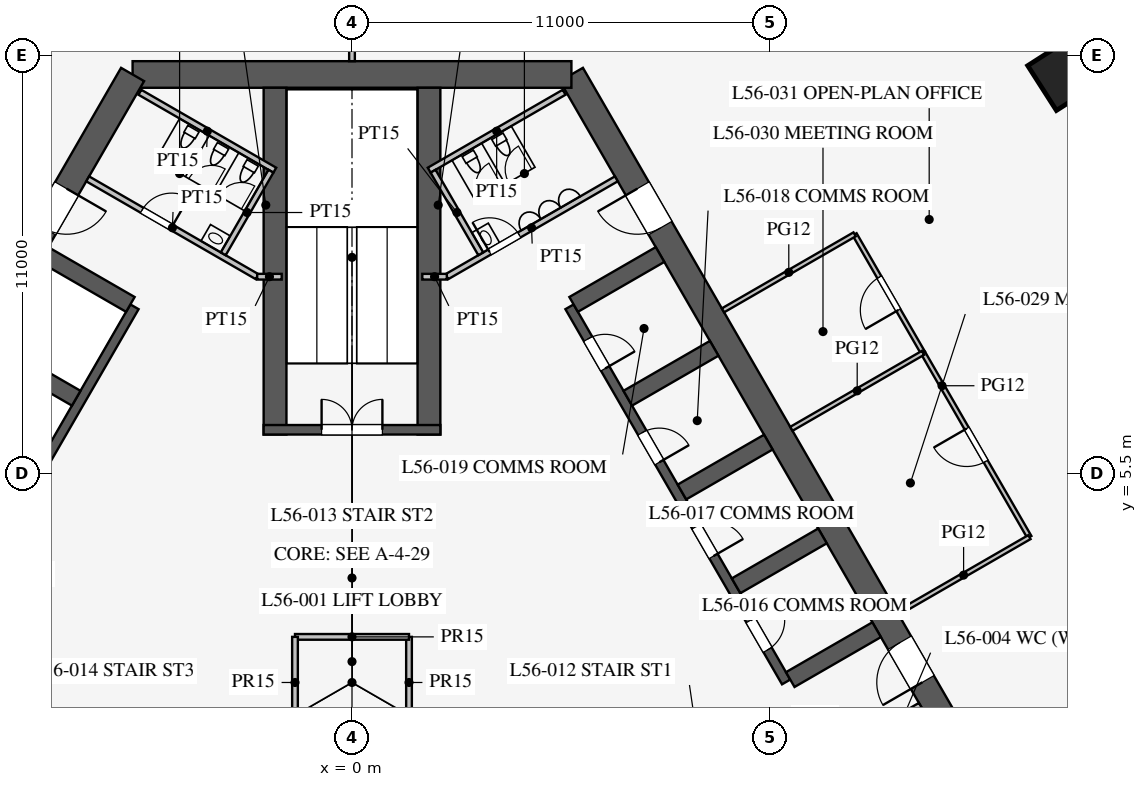
"""IFC4 building model, lengths in metres.
Left out: names, types, materials, properties, quantities, classifications, styles, units other than length and angle.
Written with IfcOpenShell. Run it as: python <this file> out.ifc"""

import sys

from ifc_helpers import new_model, si_unit, direction, frame, frame_2d, origin, origin_2d, place, context, subcontext, project, spatial, rectangle, extrude, element, fill, save


model = new_model("IFC4")
c1 = context("Model", 3, precision=1e-05, world=origin(), true_north=direction((0.0, 1.0)))
c2 = subcontext(c1, "Body", "Model", "MODEL_VIEW")
j1 = project(units=[si_unit("LENGTHUNIT", "METRE"), si_unit("PLANEANGLEUNIT", "RADIAN")], contexts=[c1])
p1 = place(None, origin())
s1 = spatial("IfcSite", under=j1, at=p1, CompositionType="ELEMENT")
p2 = place(p1, origin())
s2 = spatial("IfcBuilding", under=s1, at=p2, CompositionType="ELEMENT")
p3 = place(p2, frame((0.0, 0.0, 244.3)))
s3 = spatial("IfcBuildingStorey", under=s2, at=p3, CompositionType="ELEMENT", Elevation=244.3)
p4 = place(p3, frame((18.748, 16.02, 0.0), z_axis=(0.0, 0.0, 1.0), x_axis=(-0.539270410114, 0.842132664593, 0.0)))
e1 = element("IfcColumn", 1, at=p4, inside=s3, PredefinedType="COLUMN", context=c2, shape_type="SweptSolid", body=[
    extrude(rectangle(XDim=1.4, YDim=1.4, at=origin_2d()), origin(), (0.0, 0.0, 1.0), 4.2),
])
p5 = place(p3, frame((16.743, -3.0, 0.0), z_axis=(0.0, 0.0, 1.0), x_axis=(-0.500002442456, 0.866023993627, 0.0)))
e2 = element("IfcWall", 2, at=p5, inside=s3, PredefinedType="SHEAR", context=c2, shape_type="SweptSolid", body=[
    extrude(rectangle(XDim=21.939, YDim=0.7, at=frame_2d((10.97, 0.0))), origin(), (0.0, 0.0, 1.0), 4.2),
])
p6 = place(p5, frame((17.27, 0.0, 0.0)))
e3 = element("IfcOpeningElement", 3, at=p6, cuts=e2, PredefinedType="OPENING", context=c2, shape_type="SweptSolid", body=[
    extrude(rectangle(XDim=1.2, YDim=2.1, at=frame_2d((0.6, 1.05))), frame((0.0, 0.36, 0.0), z_axis=(0.0, -1.0, 0.0), x_axis=(1.0, 0.0, 0.0)), (0.0, 0.0, 1.0), 0.72),
])
p7 = place(p5, frame((3.47, 0.0, 0.0)))
e4 = element("IfcOpeningElement", 4, at=p7, cuts=e2, PredefinedType="OPENING", context=c2, shape_type="SweptSolid", body=[
    extrude(rectangle(XDim=1.2, YDim=2.1, at=frame_2d((0.6, 1.05))), frame((0.0, 0.36, 0.0), z_axis=(0.0, -1.0, 0.0), x_axis=(1.0, 0.0, 0.0)), (0.0, 0.0, 1.0), 0.72),
])
p8 = place(p3, frame((5.773, 16.0, 0.0), z_axis=(0.0, 0.0, 1.0), x_axis=(-1.0, 0.0, 0.0)))
e5 = element("IfcWall", 5, at=p8, inside=s3, PredefinedType="SHEAR", context=c2, shape_type="SweptSolid", body=[
    extrude(rectangle(XDim=11.547, YDim=0.7, at=frame_2d((5.773, 0.0))), origin(), (0.0, 0.0, 1.0), 4.2),
])
p9 = place(p3, frame((-5.773, 16.0, 0.0), z_axis=(0.0, 0.0, 1.0), x_axis=(-0.500002442456, -0.866023993627, 0.0)))
e6 = element("IfcWall", 6, at=p9, inside=s3, PredefinedType="SHEAR", context=c2, shape_type="SweptSolid", body=[
    extrude(rectangle(XDim=21.939, YDim=0.7, at=frame_2d((10.97, 0.0))), origin(), (0.0, 0.0, 1.0), 4.2),
])
p10 = place(p9, frame((17.27, 0.0, 0.0)))
e7 = element("IfcOpeningElement", 7, at=p10, cuts=e6, PredefinedType="OPENING", context=c2, shape_type="SweptSolid", body=[
    extrude(rectangle(XDim=1.2, YDim=2.1, at=frame_2d((0.6, 1.05))), frame((0.0, 0.36, 0.0), z_axis=(0.0, -1.0, 0.0), x_axis=(1.0, 0.0, 0.0)), (0.0, 0.0, 1.0), 0.72),
])
p11 = place(p9, frame((3.47, 0.0, 0.0)))
e8 = element("IfcOpeningElement", 8, at=p11, cuts=e6, PredefinedType="OPENING", context=c2, shape_type="SweptSolid", body=[
    extrude(rectangle(XDim=1.2, YDim=2.1, at=frame_2d((0.6, 1.05))), frame((0.0, 0.36, 0.0), z_axis=(0.0, -1.0, 0.0), x_axis=(1.0, 0.0, 0.0)), (0.0, 0.0, 1.0), 0.72),
])
p12 = place(p3, frame((11.424, 0.014, 0.0), z_axis=(0.0, 0.0, 1.0), x_axis=(-0.500001763848, 0.866024385424, 0.0)))
e9 = element("IfcWall", 9, at=p12, inside=s3, PredefinedType="SHEAR", context=c2, shape_type="SweptSolid", body=[
    extrude(rectangle(XDim=11.4, YDim=0.25, at=frame_2d((5.7, 0.0))), origin(), (0.0, 0.0, 1.0), 4.2),
])
p13 = place(p12, frame((0.975, 0.0, 0.0)))
e10 = element("IfcOpeningElement", 10, at=p13, cuts=e9, PredefinedType="OPENING", context=c2, shape_type="SweptSolid", body=[
    extrude(rectangle(XDim=0.9, YDim=2.1, at=frame_2d((0.45, 1.05))), frame((0.0, 0.135, 0.0), z_axis=(0.0, -1.0, 0.0), x_axis=(1.0, 0.0, 0.0)), (0.0, 0.0, 1.0), 0.27),
])
p14 = place(p12, frame((3.825, 0.0, 0.0)))
e11 = element("IfcOpeningElement", 11, at=p14, cuts=e9, PredefinedType="OPENING", context=c2, shape_type="SweptSolid", body=[
    extrude(rectangle(XDim=0.9, YDim=2.1, at=frame_2d((0.45, 1.05))), frame((0.0, 0.135, 0.0), z_axis=(0.0, -1.0, 0.0), x_axis=(1.0, 0.0, 0.0)), (0.0, 0.0, 1.0), 0.27),
])
p15 = place(p12, frame((6.675, 0.0, 0.0)))
e12 = element("IfcOpeningElement", 12, at=p15, cuts=e9, PredefinedType="OPENING", context=c2, shape_type="SweptSolid", body=[
    extrude(rectangle(XDim=0.9, YDim=2.1, at=frame_2d((0.45, 1.05))), frame((0.0, 0.135, 0.0), z_axis=(0.0, -1.0, 0.0), x_axis=(1.0, 0.0, 0.0)), (0.0, 0.0, 1.0), 0.27),
])
p16 = place(p12, frame((9.525, 0.0, 0.0)))
e13 = element("IfcOpeningElement", 13, at=p16, cuts=e9, PredefinedType="OPENING", context=c2, shape_type="SweptSolid", body=[
    extrude(rectangle(XDim=0.9, YDim=2.1, at=frame_2d((0.45, 1.05))), frame((0.0, 0.135, 0.0), z_axis=(0.0, -1.0, 0.0), x_axis=(1.0, 0.0, 0.0)), (0.0, 0.0, 1.0), 0.27),
])
for number, where, z_axis, x_axis in (
    (14, (11.532, 0.076, 0.0), (0.0, 0.0, 1.0), (0.866, 0.5, 0.0)),
    (15, (10.107, 2.544, 0.0), (0.0, 0.0, 1.0), (0.866, 0.5, 0.0)),
    (16, (8.682, 5.012, 0.0), (0.0, 0.0, 1.0), (0.866, 0.5, 0.0)),
    (17, (7.257, 7.481, 0.0), (0.0, 0.0, 1.0), (0.866, 0.5, 0.0)),
    (18, (5.832, 9.949, 0.0), (0.0, 0.0, 1.0), (0.866, 0.5, 0.0)),
):
    element("IfcWall", number, at=place(p3, frame(where, z_axis=z_axis, x_axis=x_axis)), inside=s3, PredefinedType="SHEAR", context=c2, shape_type="SweptSolid", body=[
        extrude(rectangle(XDim=2.625, YDim=0.45, at=frame_2d((1.312, 0.0))), origin(), (0.0, 0.0, 1.0), 4.2),
    ])
p17 = place(p3, frame((-5.724, 9.886, 0.0), z_axis=(0.0, 0.0, 1.0), x_axis=(-0.500001763848, -0.866024385424, 0.0)))
e19 = element("IfcWall", 19, at=p17, inside=s3, PredefinedType="SHEAR", context=c2, shape_type="SweptSolid", body=[
    extrude(rectangle(XDim=11.4, YDim=0.25, at=frame_2d((5.7, 0.0))), origin(), (0.0, 0.0, 1.0), 4.2),
])
p18 = place(p17, frame((6.525, 0.0, 0.0)))
e20 = element("IfcOpeningElement", 20, at=p18, cuts=e19, PredefinedType="OPENING", context=c2, shape_type="SweptSolid", body=[
    extrude(rectangle(XDim=1.2, YDim=2.2, at=frame_2d((0.6, 1.1))), frame((0.0, 0.135, 0.0), z_axis=(0.0, -1.0, 0.0), x_axis=(1.0, 0.0, 0.0)), (0.0, 0.0, 1.0), 0.27),
])
p19 = place(p17, frame((9.375, 0.0, 0.0)))
e21 = element("IfcOpeningElement", 21, at=p19, cuts=e19, PredefinedType="OPENING", context=c2, shape_type="SweptSolid", body=[
    extrude(rectangle(XDim=1.2, YDim=2.2, at=frame_2d((0.6, 1.1))), frame((0.0, 0.135, 0.0), z_axis=(0.0, -1.0, 0.0), x_axis=(1.0, 0.0, 0.0)), (0.0, 0.0, 1.0), 0.27),
])
for number, where, z_axis, x_axis in (
    (22, (-5.832, 9.949, 0.0), (0.0, 0.0, 1.0), (-0.866, 0.5, 0.0)),
    (23, (-7.257, 7.481, 0.0), (0.0, 0.0, 1.0), (-0.866, 0.5, 0.0)),
):
    element("IfcWall", number, at=place(p3, frame(where, z_axis=z_axis, x_axis=x_axis)), inside=s3, PredefinedType="SHEAR", context=c2, shape_type="SweptSolid", body=[
        extrude(rectangle(XDim=2.625, YDim=0.45, at=frame_2d((1.312, 0.0))), origin(), (0.0, 0.0, 1.0), 4.2),
    ])
for number, where, z_axis, x_axis in (
    (24, (2.025, 6.525, 0.0), (0.0, 0.0, 1.0), (0.0, 1.0, 0.0)),
    (25, (-2.025, 6.525, 0.0), (0.0, 0.0, 1.0), (0.0, 1.0, 0.0)),
):
    element("IfcWall", number, at=place(p3, frame(where, z_axis=z_axis, x_axis=x_axis)), inside=s3, PredefinedType="SHEAR", context=c2, shape_type="SweptSolid", body=[
        extrude(rectangle(XDim=9.125, YDim=0.6, at=frame_2d((4.562, 0.0))), origin(), (0.0, 0.0, 1.0), 4.2),
    ])
p20 = place(p3, frame((2.325, 6.65, 0.0), z_axis=(0.0, 0.0, 1.0), x_axis=(-1.0, 0.0, 0.0)))
e26 = element("IfcWall", 26, at=p20, inside=s3, PredefinedType="SHEAR", context=c2, shape_type="SweptSolid", body=[
    extrude(rectangle(XDim=4.65, YDim=0.25, at=frame_2d((2.325, 0.0))), origin(), (0.0, 0.0, 1.0), 4.2),
])
p21 = place(p20, frame((1.525, 0.0, 0.0)))
e27 = element("IfcOpeningElement", 27, at=p21, cuts=e26, PredefinedType="OPENING", context=c2, shape_type="SweptSolid", body=[
    extrude(rectangle(XDim=1.6, YDim=2.1, at=frame_2d((0.8, 1.05))), frame((0.0, 0.135, 0.0), z_axis=(0.0, -1.0, 0.0), x_axis=(1.0, 0.0, 0.0)), (0.0, 0.0, 1.0), 0.27),
])
p22 = place(p3, frame((2.495, 10.678, 0.0), z_axis=(0.0, 0.0, 1.0), x_axis=(0.866037967349, 0.499978238636, 0.0)))
e28 = element("IfcWall", 28, at=p22, inside=s3, PredefinedType="PARTITIONING", context=c2, shape_type="SweptSolid", body=[
    extrude(rectangle(XDim=5.15, YDim=0.15, at=frame_2d((2.575, 0.0))), origin(), (0.0, 0.0, 1.0), 4.0),
])
p23 = place(p22, frame((1.3, 0.0, 0.0)))
e29 = element("IfcOpeningElement", 29, at=p23, cuts=e28, PredefinedType="OPENING", context=c2, shape_type="SweptSolid", body=[
    extrude(rectangle(XDim=0.9, YDim=2.1, at=frame_2d((0.45, 1.05))), frame((0.0, 0.085, 0.0), z_axis=(0.0, -1.0, 0.0), x_axis=(1.0, 0.0, 0.0)), (0.0, 0.0, 1.0), 0.17),
])
p24 = place(p3, frame((10.495, -3.178, 0.0), z_axis=(0.0, 0.0, 1.0), x_axis=(0.866037967349, 0.499978238636, 0.0)))
e30 = element("IfcWall", 30, at=p24, inside=s3, PredefinedType="PARTITIONING", context=c2, shape_type="SweptSolid", body=[
    extrude(rectangle(XDim=5.15, YDim=0.15, at=frame_2d((2.575, 0.0))), origin(), (0.0, 0.0, 1.0), 4.0),
])
p25 = place(p24, frame((2.6, 0.0, 0.0)))
e31 = element("IfcOpeningElement", 31, at=p25, cuts=e30, PredefinedType="OPENING", context=c2, shape_type="SweptSolid", body=[
    extrude(rectangle(XDim=0.9, YDim=2.1, at=frame_2d((0.45, 1.05))), frame((0.0, 0.085, 0.0), z_axis=(0.0, -1.0, 0.0), x_axis=(1.0, 0.0, 0.0)), (0.0, 0.0, 1.0), 0.17),
])
p26 = place(p3, frame((-2.495, 10.678, 0.0), z_axis=(0.0, 0.0, 1.0), x_axis=(-0.866037967349, 0.499978238636, 0.0)))
e32 = element("IfcWall", 32, at=p26, inside=s3, PredefinedType="PARTITIONING", context=c2, shape_type="SweptSolid", body=[
    extrude(rectangle(XDim=5.15, YDim=0.15, at=frame_2d((2.575, 0.0))), origin(), (0.0, 0.0, 1.0), 4.0),
])
p27 = place(p26, frame((2.6, 0.0, 0.0)))
e33 = element("IfcOpeningElement", 33, at=p27, cuts=e32, PredefinedType="OPENING", context=c2, shape_type="SweptSolid", body=[
    extrude(rectangle(XDim=0.9, YDim=2.1, at=frame_2d((0.45, 1.05))), frame((0.0, 0.085, 0.0), z_axis=(0.0, -1.0, 0.0), x_axis=(1.0, 0.0, 0.0)), (0.0, 0.0, 1.0), 0.17),
])
for number, where, z_axis, x_axis in (
    (34, (2.495, 10.678, 0.0), (0.0, 0.0, 1.0), (-1.0, 0.0, 0.0)),
    (35, (-2.495, 10.678, 0.0), (0.0, 0.0, 1.0), (1.0, 0.0, 0.0)),
):
    element("IfcWall", number, at=place(p3, frame(where, z_axis=z_axis, x_axis=x_axis)), inside=s3, PredefinedType="PARTITIONING", context=c2, shape_type="SweptSolid", body=[
        extrude(rectangle(XDim=0.645, YDim=0.15, at=frame_2d((0.323, 0.0))), origin(), (0.0, 0.0, 1.0), 4.0),
    ])
p28 = place(p3, frame((2.031, 13.482, 0.0), z_axis=(0.0, 0.0, 1.0), x_axis=(0.866050731258, 0.499956128963, 0.0)))
e36 = element("IfcWall", 36, at=p28, inside=s3, PredefinedType="PARTITIONING", context=c2, shape_type="SweptSolid", body=[
    extrude(rectangle(XDim=4.1, YDim=0.15, at=frame_2d((2.05, 0.0))), origin(), (0.0, 0.0, 1.0), 4.0),
])
p29 = place(p3, frame((3.389, 11.281, 0.0), z_axis=(0.0, 0.0, 1.0), x_axis=(-0.499989096993, 0.866031698547, 0.0)))
e37 = element("IfcWall", 37, at=p29, inside=s3, PredefinedType="PARTITIONING", context=c2, shape_type="SweptSolid", body=[
    extrude(rectangle(XDim=2.51, YDim=0.15, at=frame_2d((1.255, 0.0))), origin(), (0.0, 0.0, 1.0), 4.0),
])
p30 = place(p3, frame((-2.031, 13.482, 0.0), z_axis=(0.0, 0.0, 1.0), x_axis=(-0.866050731258, 0.499956128963, 0.0)))
e38 = element("IfcWall", 38, at=p30, inside=s3, PredefinedType="PARTITIONING", context=c2, shape_type="SweptSolid", body=[
    extrude(rectangle(XDim=4.1, YDim=0.15, at=frame_2d((2.05, 0.0))), origin(), (0.0, 0.0, 1.0), 4.0),
])
p31 = place(p3, frame((-3.389, 11.281, 0.0), z_axis=(0.0, 0.0, 1.0), x_axis=(0.499989096993, 0.866031698547, 0.0)))
e39 = element("IfcWall", 39, at=p31, inside=s3, PredefinedType="PARTITIONING", context=c2, shape_type="SweptSolid", body=[
    extrude(rectangle(XDim=2.51, YDim=0.15, at=frame_2d((1.255, 0.0))), origin(), (0.0, 0.0, 1.0), 4.0),
])
p32 = place(p3, frame((1.5, -1.2, 0.0), z_axis=(0.0, 0.0, 1.0), x_axis=(0.0, 1.0, 0.0)))
e40 = element("IfcWall", 40, at=p32, inside=s3, PredefinedType="PARTITIONING", context=c2, shape_type="SweptSolid", body=[
    extrude(rectangle(XDim=2.4, YDim=0.15, at=frame_2d((1.2, 0.0))), origin(), (0.0, 0.0, 1.0), 4.0),
])
p33 = place(p3, frame((1.5, 1.2, 0.0), z_axis=(0.0, 0.0, 1.0), x_axis=(-1.0, 0.0, 0.0)))
e41 = element("IfcWall", 41, at=p33, inside=s3, PredefinedType="PARTITIONING", context=c2, shape_type="SweptSolid", body=[
    extrude(rectangle(XDim=3.0, YDim=0.15, at=frame_2d((1.5, 0.0))), origin(), (0.0, 0.0, 1.0), 4.0),
])
p34 = place(p3, frame((-1.5, 1.2, 0.0), z_axis=(0.0, 0.0, 1.0), x_axis=(0.0, -1.0, 0.0)))
e42 = element("IfcWall", 42, at=p34, inside=s3, PredefinedType="PARTITIONING", context=c2, shape_type="SweptSolid", body=[
    extrude(rectangle(XDim=2.4, YDim=0.15, at=frame_2d((1.2, 0.0))), origin(), (0.0, 0.0, 1.0), 4.0),
])
p35 = place(p3, frame((0.0, 16.35, 0.0), z_axis=(0.0, 0.0, 1.0), x_axis=(0.0, 1.0, 0.0)))
e43 = element("IfcWall", 43, at=p35, inside=s3, PredefinedType="PARTITIONING", context=c2, shape_type="SweptSolid", body=[
    extrude(rectangle(XDim=15.0, YDim=0.15, at=frame_2d((7.5, 0.0))), origin(), (0.0, 0.0, 1.0), 2.4),
])
p36 = place(p3, frame((15.026, 8.675, 0.0), z_axis=(0.0, 0.0, 1.0), x_axis=(-0.500012057535, 0.866018442252, 0.0)))
e44 = element("IfcWall", 44, at=p36, inside=s3, PredefinedType="PARTITIONING", context=c2, shape_type="SweptSolid", body=[
    extrude(rectangle(XDim=3.6, YDim=0.12, at=frame_2d((1.8, 0.0))), origin(), (0.0, 0.0, 1.0), 2.9),
])
p37 = place(p36, frame((1.3, 0.0, 0.15)))
e45 = element("IfcOpeningElement", 45, at=p37, cuts=e44, PredefinedType="OPENING", context=c2, shape_type="SweptSolid", body=[
    extrude(rectangle(XDim=1.0, YDim=2.1, at=frame_2d((0.5, 1.05))), frame((0.0, 0.07, 0.0), z_axis=(0.0, -1.0, 0.0), x_axis=(1.0, 0.0, 0.0)), (0.0, 0.0, 1.0), 0.14),
])
p38 = place(p3, frame((17.825, 3.825, 0.0), z_axis=(0.0, 0.0, 1.0), x_axis=(-0.499965239061, 0.866045472092, 0.0)))
e46 = element("IfcWall", 46, at=p38, inside=s3, PredefinedType="PARTITIONING", context=c2, shape_type="SweptSolid", body=[
    extrude(rectangle(XDim=5.6, YDim=0.12, at=frame_2d((2.8, 0.0))), origin(), (0.0, 0.0, 1.0), 2.9),
])
p39 = place(p38, frame((2.3, 0.0, 0.15)))
e47 = element("IfcOpeningElement", 47, at=p39, cuts=e46, PredefinedType="OPENING", context=c2, shape_type="SweptSolid", body=[
    extrude(rectangle(XDim=1.0, YDim=2.1, at=frame_2d((0.5, 1.05))), frame((0.0, 0.07, 0.0), z_axis=(0.0, -1.0, 0.0), x_axis=(1.0, 0.0, 0.0)), (0.0, 0.0, 1.0), 0.14),
])
for number, where, z_axis, x_axis in (
    (48, (9.761, 9.793, 0.0), (0.0, 0.0, 1.0), (0.866, 0.5, 0.0)),
    (49, (11.562, 6.675, 0.0), (0.0, 0.0, 1.0), (0.866, 0.5, 0.0)),
    (50, (14.361, 1.825, 0.0), (0.0, 0.0, 1.0), (0.866, 0.5, 0.0)),
):
    element("IfcWall", number, at=place(p3, frame(where, z_axis=z_axis, x_axis=x_axis)), inside=s3, PredefinedType="PARTITIONING", context=c2, shape_type="SweptSolid", body=[
        extrude(rectangle(XDim=4.0, YDim=0.12, at=frame_2d((2.0, 0.0))), origin(), (0.0, 0.0, 1.0), 2.9),
    ])
p40 = place(p23, origin())
e51 = element("IfcDoor", 51, at=p40, inside=s3, OperationType="SINGLE_SWING_LEFT", PredefinedType="DOOR", context=c2, shape_type="SweptSolid", body=[
    extrude(rectangle(XDim=0.9, YDim=2.1, at=frame_2d((0.45, 1.05))), frame((0.0, 0.025, 0.0), z_axis=(0.0, -1.0, 0.0), x_axis=(1.0, 0.0, 0.0)), (0.0, 0.0, 1.0), 0.05),
])
fill(e29, e51)
p41 = place(p27, frame((0.9, 0.0, 0.0), z_axis=(0.0, 0.0, 1.0), x_axis=(-1.0, 0.0, 0.0)))
e52 = element("IfcDoor", 52, at=p41, inside=s3, OperationType="SINGLE_SWING_RIGHT", PredefinedType="DOOR", context=c2, shape_type="SweptSolid", body=[
    extrude(rectangle(XDim=0.9, YDim=2.1, at=frame_2d((0.45, 1.05))), frame((0.0, 0.025, 0.0), z_axis=(0.0, -1.0, 0.0), x_axis=(1.0, 0.0, 0.0)), (0.0, 0.0, 1.0), 0.05),
])
fill(e33, e52)
p42 = place(p21, frame((1.6, 0.0, 0.0), z_axis=(0.0, 0.0, 1.0), x_axis=(-1.0, 0.0, 0.0)))
e53 = element("IfcDoor", 53, at=p42, inside=s3, OperationType="DOUBLE_DOOR_SINGLE_SWING", PredefinedType="DOOR", context=c2, shape_type="SweptSolid", body=[
    extrude(rectangle(XDim=1.6, YDim=2.1, at=frame_2d((0.8, 1.05))), frame((0.0, 0.025, 0.0), z_axis=(0.0, -1.0, 0.0), x_axis=(1.0, 0.0, 0.0)), (0.0, 0.0, 1.0), 0.05),
])
fill(e27, e53)
p43 = place(p6, origin())
e54 = element("IfcDoor", 54, at=p43, inside=s3, OperationType="SINGLE_SWING_RIGHT", PredefinedType="DOOR", context=c2, shape_type="SweptSolid", body=[
    extrude(rectangle(XDim=1.2, YDim=2.1, at=frame_2d((0.6, 1.05))), frame((0.0, 0.025, 0.0), z_axis=(0.0, -1.0, 0.0), x_axis=(1.0, 0.0, 0.0)), (0.0, 0.0, 1.0), 0.05),
])
fill(e3, e54)
p44 = place(p7, origin())
e55 = element("IfcDoor", 55, at=p44, inside=s3, OperationType="SINGLE_SWING_LEFT", PredefinedType="DOOR", context=c2, shape_type="SweptSolid", body=[
    extrude(rectangle(XDim=1.2, YDim=2.1, at=frame_2d((0.6, 1.05))), frame((0.0, 0.025, 0.0), z_axis=(0.0, -1.0, 0.0), x_axis=(1.0, 0.0, 0.0)), (0.0, 0.0, 1.0), 0.05),
])
fill(e4, e55)
p45 = place(p11, origin())
e56 = element("IfcDoor", 56, at=p45, inside=s3, OperationType="SINGLE_SWING_LEFT", PredefinedType="DOOR", context=c2, shape_type="SweptSolid", body=[
    extrude(rectangle(XDim=1.2, YDim=2.1, at=frame_2d((0.6, 1.05))), frame((0.0, 0.025, 0.0), z_axis=(0.0, -1.0, 0.0), x_axis=(1.0, 0.0, 0.0)), (0.0, 0.0, 1.0), 0.05),
])
fill(e8, e56)
p46 = place(p13, frame((0.9, 0.0, 0.0), z_axis=(0.0, 0.0, 1.0), x_axis=(-1.0, 0.0, 0.0)))
e57 = element("IfcDoor", 57, at=p46, inside=s3, OperationType="SINGLE_SWING_LEFT", PredefinedType="DOOR", context=c2, shape_type="SweptSolid", body=[
    extrude(rectangle(XDim=0.9, YDim=2.1, at=frame_2d((0.45, 1.05))), frame((0.0, 0.025, 0.0), z_axis=(0.0, -1.0, 0.0), x_axis=(1.0, 0.0, 0.0)), (0.0, 0.0, 1.0), 0.05),
])
fill(e10, e57)
p47 = place(p14, frame((0.9, 0.0, 0.0), z_axis=(0.0, 0.0, 1.0), x_axis=(-1.0, 0.0, 0.0)))
e58 = element("IfcDoor", 58, at=p47, inside=s3, OperationType="SINGLE_SWING_RIGHT", PredefinedType="DOOR", context=c2, shape_type="SweptSolid", body=[
    extrude(rectangle(XDim=0.9, YDim=2.1, at=frame_2d((0.45, 1.05))), frame((0.0, 0.025, 0.0), z_axis=(0.0, -1.0, 0.0), x_axis=(1.0, 0.0, 0.0)), (0.0, 0.0, 1.0), 0.05),
])
fill(e11, e58)
p48 = place(p15, frame((0.9, 0.0, 0.0), z_axis=(0.0, 0.0, 1.0), x_axis=(-1.0, 0.0, 0.0)))
e59 = element("IfcDoor", 59, at=p48, inside=s3, OperationType="SINGLE_SWING_RIGHT", PredefinedType="DOOR", context=c2, shape_type="SweptSolid", body=[
    extrude(rectangle(XDim=0.9, YDim=2.1, at=frame_2d((0.45, 1.05))), frame((0.0, 0.025, 0.0), z_axis=(0.0, -1.0, 0.0), x_axis=(1.0, 0.0, 0.0)), (0.0, 0.0, 1.0), 0.05),
])
fill(e12, e59)
p49 = place(p16, frame((0.9, 0.0, 0.0), z_axis=(0.0, 0.0, 1.0), x_axis=(-1.0, 0.0, 0.0)))
e60 = element("IfcDoor", 60, at=p49, inside=s3, OperationType="SINGLE_SWING_RIGHT", PredefinedType="DOOR", context=c2, shape_type="SweptSolid", body=[
    extrude(rectangle(XDim=0.9, YDim=2.1, at=frame_2d((0.45, 1.05))), frame((0.0, 0.025, 0.0), z_axis=(0.0, -1.0, 0.0), x_axis=(1.0, 0.0, 0.0)), (0.0, 0.0, 1.0), 0.05),
])
fill(e13, e60)
p50 = place(p39, origin())
e61 = element("IfcDoor", 61, at=p50, inside=s3, OperationType="SINGLE_SWING_RIGHT", PredefinedType="DOOR", context=c2, shape_type="SweptSolid", body=[
    extrude(rectangle(XDim=1.0, YDim=2.1, at=frame_2d((0.5, 1.05))), frame((0.0, 0.025, 0.0), z_axis=(0.0, -1.0, 0.0), x_axis=(1.0, 0.0, 0.0)), (0.0, 0.0, 1.0), 0.05),
])
fill(e47, e61)
p51 = place(p37, origin())
e62 = element("IfcDoor", 62, at=p51, inside=s3, OperationType="SINGLE_SWING_LEFT", PredefinedType="DOOR", context=c2, shape_type="SweptSolid", body=[
    extrude(rectangle(XDim=1.0, YDim=2.1, at=frame_2d((0.5, 1.05))), frame((0.0, 0.025, 0.0), z_axis=(0.0, -1.0, 0.0), x_axis=(1.0, 0.0, 0.0)), (0.0, 0.0, 1.0), 0.05),
])
fill(e45, e62)
save(model, sys.argv[1])
